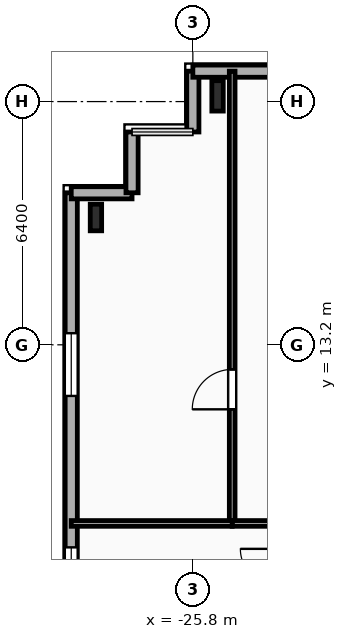
"""IFC4 building model, lengths in metres.
Left out: names, types, materials, properties, quantities, classifications, styles, units other than length and angle.
Written with IfcOpenShell. Run it as: python <this file> out.ifc"""

import sys

from ifc_helpers import new_model, si_unit, direction, frame, frame_2d, origin, origin_2d, place, context, subcontext, project, spatial, rectangle, i_section, extrude, element, fill, save


model = new_model("IFC4")
c1 = context("Model", 3, precision=1e-05, world=origin(), true_north=direction((0.0, 1.0)))
c2 = subcontext(c1, "Body", "Model", "MODEL_VIEW")
j1 = project(units=[si_unit("LENGTHUNIT", "METRE"), si_unit("PLANEANGLEUNIT", "RADIAN")], contexts=[c1])
p1 = place(None, origin())
s1 = spatial("IfcSite", under=j1, at=p1, CompositionType="ELEMENT")
p2 = place(p1, origin())
s2 = spatial("IfcBuilding", under=s1, at=p2, CompositionType="ELEMENT")
p3 = place(p2, frame((0.0, 0.0, 151.1)))
s3 = spatial("IfcBuildingStorey", under=s2, at=p3, CompositionType="ELEMENT", Elevation=151.1)
p4 = place(p3, frame((-25.15, 19.75, 0.0), z_axis=(0.0, 0.0, 1.0), x_axis=(1.0, 0.0, 0.0)))
e1 = element("IfcColumn", 1, at=p4, inside=s3, PredefinedType="COLUMN", context=c2, shape_type="SweptSolid", body=[
    extrude(i_section(OverallWidth=0.3, OverallDepth=0.8, WebThickness=0.018, FlangeThickness=0.033, FilletRadius=0.03, at=origin_2d()), origin(), (0.0, 0.0, 1.0), 3.35),
])
p5 = place(p3, frame((-28.35, 16.55, 0.0), z_axis=(0.0, 0.0, 1.0), x_axis=(1.0, 0.0, 0.0)))
e2 = element("IfcColumn", 2, at=p5, inside=s3, PredefinedType="COLUMN", context=c2, shape_type="SweptSolid", body=[
    extrude(i_section(OverallWidth=0.3, OverallDepth=0.7, WebThickness=0.017, FlangeThickness=0.032, FilletRadius=0.027, at=origin_2d()), origin(), (0.0, 0.0, 1.0), 3.35),
])
p6 = place(p3, frame((-29.0, -12.4, 0.0), z_axis=(0.0, 0.0, 1.0), x_axis=(0.0, 1.0, 0.0)))
e3 = element("IfcWall", 3, at=p6, inside=s3, PredefinedType="SOLIDWALL", context=c2, shape_type="SweptSolid", body=[
    extrude(rectangle(XDim=29.6, YDim=0.32, at=frame_2d((14.8, 0.0))), origin(), (0.0, 0.0, 1.0), 3.04),
])
p7 = place(p6, frame((2.855, 0.0, 0.85)))
e4 = element("IfcOpeningElement", 4, at=p7, cuts=e3, PredefinedType="OPENING", context=c2, shape_type="SweptSolid", body=[
    extrude(rectangle(XDim=1.65, YDim=1.85, at=frame_2d((0.825, 0.925))), frame((0.0, 0.17, 0.0), z_axis=(0.0, -1.0, 0.0), x_axis=(1.0, 0.0, 0.0)), (0.0, 0.0, 1.0), 0.34),
])
p8 = place(p6, frame((9.865, 0.0, 0.85)))
e5 = element("IfcOpeningElement", 5, at=p8, cuts=e3, PredefinedType="OPENING", context=c2, shape_type="SweptSolid", body=[
    extrude(rectangle(XDim=1.95, YDim=1.85, at=frame_2d((0.975, 0.925))), frame((0.0, 0.17, 0.0), z_axis=(0.0, -1.0, 0.0), x_axis=(1.0, 0.0, 0.0)), (0.0, 0.0, 1.0), 0.34),
])
p9 = place(p6, frame((13.13, 0.0, 0.85)))
e6 = element("IfcOpeningElement", 6, at=p9, cuts=e3, PredefinedType="OPENING", context=c2, shape_type="SweptSolid", body=[
    extrude(rectangle(XDim=1.5, YDim=1.85, at=frame_2d((0.75, 0.925))), frame((0.0, 0.17, 0.0), z_axis=(0.0, -1.0, 0.0), x_axis=(1.0, 0.0, 0.0)), (0.0, 0.0, 1.0), 0.34),
])
p10 = place(p6, frame((15.93, 0.0, 0.85)))
e7 = element("IfcOpeningElement", 7, at=p10, cuts=e3, PredefinedType="OPENING", context=c2, shape_type="SweptSolid", body=[
    extrude(rectangle(XDim=1.5, YDim=1.85, at=frame_2d((0.75, 0.925))), frame((0.0, 0.17, 0.0), z_axis=(0.0, -1.0, 0.0), x_axis=(1.0, 0.0, 0.0)), (0.0, 0.0, 1.0), 0.34),
])
p11 = place(p6, frame((18.77, 0.0, 0.85)))
e8 = element("IfcOpeningElement", 8, at=p11, cuts=e3, PredefinedType="OPENING", context=c2, shape_type="SweptSolid", body=[
    extrude(rectangle(XDim=1.5, YDim=1.85, at=frame_2d((0.75, 0.925))), frame((0.0, 0.17, 0.0), z_axis=(0.0, -1.0, 0.0), x_axis=(1.0, 0.0, 0.0)), (0.0, 0.0, 1.0), 0.34),
])
p12 = place(p6, frame((24.255, 0.0, 0.85)))
e9 = element("IfcOpeningElement", 9, at=p12, cuts=e3, PredefinedType="OPENING", context=c2, shape_type="SweptSolid", body=[
    extrude(rectangle(XDim=1.65, YDim=1.85, at=frame_2d((0.825, 0.925))), frame((0.0, 0.17, 0.0), z_axis=(0.0, -1.0, 0.0), x_axis=(1.0, 0.0, 0.0)), (0.0, 0.0, 1.0), 0.34),
])
for number, where, z_axis, x_axis in (
    (10, (-29.0, 17.2, 0.0), (0.0, 0.0, 1.0), (1.0, 0.0, 0.0)),
    (11, (-27.4, 17.2, 0.0), (0.0, 0.0, 1.0), (0.0, 1.0, 0.0)),
):
    element("IfcWall", number, at=place(p3, frame(where, z_axis=z_axis, x_axis=x_axis)), inside=s3, PredefinedType="SOLIDWALL", context=c2, shape_type="SweptSolid", body=[
        extrude(rectangle(XDim=1.6, YDim=0.32, at=frame_2d((0.8, 0.0))), origin(), (0.0, 0.0, 1.0), 3.04),
    ])
p13 = place(p3, frame((-25.8, 18.8, 0.0), z_axis=(0.0, 0.0, 1.0), x_axis=(0.0, 1.0, 0.0)))
e12 = element("IfcWall", 12, at=p13, inside=s3, PredefinedType="SOLIDWALL", context=c2, shape_type="SweptSolid", body=[
    extrude(rectangle(XDim=1.6, YDim=0.32, at=frame_2d((0.8, 0.0))), origin(), (0.0, 0.0, 1.0), 3.04),
])
p14 = place(p3, frame((-25.8, 20.4, 0.0), z_axis=(0.0, 0.0, 1.0), x_axis=(1.0, 0.0, 0.0)))
e13 = element("IfcWall", 13, at=p14, inside=s3, PredefinedType="SOLIDWALL", context=c2, shape_type="SweptSolid", body=[
    extrude(rectangle(XDim=19.2, YDim=0.32, at=frame_2d((9.6, 0.0))), origin(), (0.0, 0.0, 1.0), 3.04),
])
p15 = place(p14, frame((2.135, 0.0, 0.85)))
e14 = element("IfcOpeningElement", 14, at=p15, cuts=e13, PredefinedType="OPENING", context=c2, shape_type="SweptSolid", body=[
    extrude(rectangle(XDim=1.65, YDim=1.85, at=frame_2d((0.825, 0.925))), frame((0.0, 0.17, 0.0), z_axis=(0.0, -1.0, 0.0), x_axis=(1.0, 0.0, 0.0)), (0.0, 0.0, 1.0), 0.34),
])
p16 = place(p14, frame((10.68, 0.0, 0.85)))
e15 = element("IfcOpeningElement", 15, at=p16, cuts=e13, PredefinedType="OPENING", context=c2, shape_type="SweptSolid", body=[
    extrude(rectangle(XDim=2.4, YDim=1.95, at=frame_2d((1.2, 0.975))), frame((0.0, 0.17, 0.0), z_axis=(0.0, -1.0, 0.0), x_axis=(1.0, 0.0, 0.0)), (0.0, 0.0, 1.0), 0.34),
])
p17 = place(p3, frame((-24.765, 8.5, 0.0), z_axis=(0.0, 0.0, 1.0), x_axis=(0.0, 1.0, 0.0)))
e16 = element("IfcWall", 16, at=p17, inside=s3, PredefinedType="PARTITIONING", context=c2, shape_type="SweptSolid", body=[
    extrude(rectangle(XDim=11.9, YDim=0.15, at=frame_2d((5.95, 0.0))), origin(), (0.0, 0.0, 1.0), 3.04),
])
p18 = place(p17, frame((3.002, 0.0, 0.0)))
e17 = element("IfcOpeningElement", 17, at=p18, cuts=e16, PredefinedType="OPENING", context=c2, shape_type="SweptSolid", body=[
    extrude(rectangle(XDim=1.05, YDim=2.15, at=frame_2d((0.525, 1.075))), frame((0.0, 0.085, 0.0), z_axis=(0.0, -1.0, 0.0), x_axis=(1.0, 0.0, 0.0)), (0.0, 0.0, 1.0), 0.17),
])
p19 = place(p3, frame((-23.6, 8.5, 0.0), z_axis=(0.0, 0.0, 1.0), x_axis=(-1.0, 0.0, 0.0)))
e18 = element("IfcWall", 18, at=p19, inside=s3, PredefinedType="PARTITIONING", context=c2, shape_type="SweptSolid", body=[
    extrude(rectangle(XDim=1.165, YDim=0.15, at=frame_2d((0.583, 0.0))), origin(), (0.0, 0.0, 1.0), 3.04),
])
p20 = place(p3, frame((-24.765, 8.5, 0.0), z_axis=(0.0, 0.0, 1.0), x_axis=(-1.0, 0.0, 0.0)))
e19 = element("IfcWall", 19, at=p20, inside=s3, PredefinedType="PARTITIONING", context=c2, shape_type="SweptSolid", body=[
    extrude(rectangle(XDim=4.235, YDim=0.15, at=frame_2d((2.118, 0.0))), origin(), (0.0, 0.0, 1.0), 3.04),
])
p21 = place(p11, origin())
e20 = element("IfcWindow", 20, at=p21, inside=s3, PartitioningType="SINGLE_PANEL", PredefinedType="WINDOW", context=c2, shape_type="SweptSolid", body=[
    extrude(rectangle(XDim=1.5, YDim=1.85, at=frame_2d((0.75, 0.925))), frame((0.0, 0.03, 0.0), z_axis=(0.0, -1.0, 0.0), x_axis=(1.0, 0.0, 0.0)), (0.0, 0.0, 1.0), 0.06),
])
fill(e8, e20)
p22 = place(p12, origin())
e21 = element("IfcWindow", 21, at=p22, inside=s3, PartitioningType="SINGLE_PANEL", PredefinedType="WINDOW", context=c2, shape_type="SweptSolid", body=[
    extrude(rectangle(XDim=1.65, YDim=1.85, at=frame_2d((0.825, 0.925))), frame((0.0, 0.03, 0.0), z_axis=(0.0, -1.0, 0.0), x_axis=(1.0, 0.0, 0.0)), (0.0, 0.0, 1.0), 0.06),
])
fill(e9, e21)
p23 = place(p18, origin())
e22 = element("IfcDoor", 22, at=p23, inside=s3, OperationType="SINGLE_SWING_LEFT", PredefinedType="DOOR", context=c2, shape_type="SweptSolid", body=[
    extrude(rectangle(XDim=1.05, YDim=2.15, at=frame_2d((0.525, 1.075))), frame((0.0, 0.025, 0.0), z_axis=(0.0, -1.0, 0.0), x_axis=(1.0, 0.0, 0.0)), (0.0, 0.0, 1.0), 0.05),
])
fill(e17, e22)
save(model, sys.argv[1])
